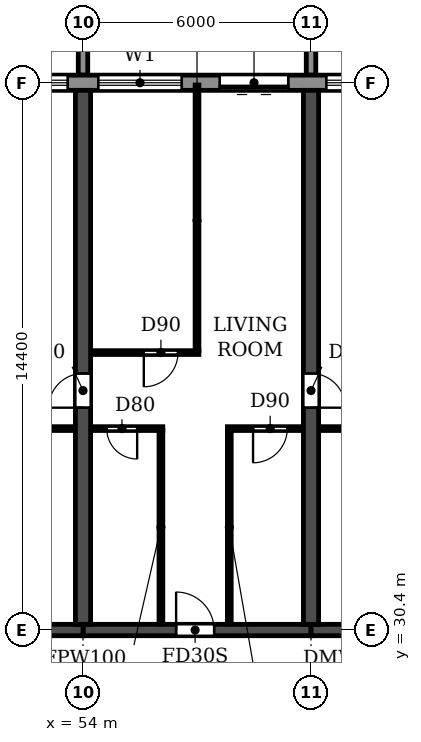
"""IFC4 building model, lengths in metres.
Left out: names, types, materials, properties, quantities, classifications, styles, units other than length and angle.
Written with IfcOpenShell. Run it as: python <this file> out.ifc"""

import sys

from ifc_helpers import new_model, si_unit, direction, frame, frame_2d, origin, place, context, subcontext, project, spatial, polyline, rectangle, outline, extrude, source, transform, mapped, element, fill, save


model = new_model("IFC4")
c1 = context("Model", 3, precision=1e-05, world=origin(), true_north=direction((0.0, 1.0)))
c2 = subcontext(c1, "Body", "Model", "MODEL_VIEW")
j1 = project(units=[si_unit("LENGTHUNIT", "METRE"), si_unit("PLANEANGLEUNIT", "RADIAN")], contexts=[c1])
p1 = place(None, origin())
s1 = spatial("IfcSite", under=j1, at=p1, CompositionType="ELEMENT")
p2 = place(p1, origin())
s2 = spatial("IfcBuilding", under=s1, at=p2, CompositionType="ELEMENT")
p3 = place(p2, frame((0.0, 0.0, 43.2)))
s3 = spatial("IfcBuildingStorey", under=s2, at=p3, CompositionType="ELEMENT", Elevation=43.2)
p4 = place(p3, frame((54.0, 30.55, 0.0), z_axis=(0.0, 0.0, 1.0), x_axis=(0.0, 1.0, 0.0)))
e1 = element("IfcWall", 1, at=p4, inside=s3, PredefinedType="SHEAR", context=c2, shape_type="SweptSolid", body=[
    extrude(rectangle(XDim=14.05, YDim=0.4, at=frame_2d((7.025, 0.0))), origin(), (0.0, 0.0, 1.0), 3.05),
])
p5 = place(p4, frame((5.7, 0.0, 0.0)))
e2 = element("IfcOpeningElement", 2, at=p5, cuts=e1, PredefinedType="OPENING", context=c2, shape_type="SweptSolid", body=[
    extrude(rectangle(XDim=0.9, YDim=2.1, at=frame_2d((0.45, 1.05))), frame((0.0, 0.21, 0.0), z_axis=(0.0, -1.0, 0.0), x_axis=(1.0, 0.0, 0.0)), (0.0, 0.0, 1.0), 0.42),
])
p6 = place(p3, frame((60.0, 30.55, 0.0), z_axis=(0.0, 0.0, 1.0), x_axis=(0.0, 1.0, 0.0)))
e3 = element("IfcWall", 3, at=p6, inside=s3, PredefinedType="SHEAR", context=c2, shape_type="SweptSolid", body=[
    extrude(rectangle(XDim=14.05, YDim=0.4, at=frame_2d((7.025, 0.0))), origin(), (0.0, 0.0, 1.0), 3.05),
])
p7 = place(p6, frame((5.7, 0.0, 0.0)))
e4 = element("IfcOpeningElement", 4, at=p7, cuts=e3, PredefinedType="OPENING", context=c2, shape_type="SweptSolid", body=[
    extrude(rectangle(XDim=0.9, YDim=2.1, at=frame_2d((0.45, 1.05))), frame((0.0, 0.21, 0.0), z_axis=(0.0, -1.0, 0.0), x_axis=(1.0, 0.0, 0.0)), (0.0, 0.0, 1.0), 0.42),
])
p8 = place(p3, frame((48.0, 30.4, 0.0), z_axis=(0.0, 0.0, 1.0), x_axis=(1.0, 0.0, 0.0)))
e5 = element("IfcWall", 5, at=p8, inside=s3, PredefinedType="SHEAR", context=c2, shape_type="SweptSolid", body=[
    extrude(rectangle(XDim=6.0, YDim=0.3, at=frame_2d((3.0, 0.0))), origin(), (0.0, 0.0, 1.0), 2.45),
])
p9 = place(p3, frame((54.0, 30.4, 0.0), z_axis=(0.0, 0.0, 1.0), x_axis=(1.0, 0.0, 0.0)))
e6 = element("IfcWall", 6, at=p9, inside=s3, PredefinedType="SHEAR", context=c2, shape_type="SweptSolid", body=[
    extrude(rectangle(XDim=6.0, YDim=0.3, at=frame_2d((3.0, 0.0))), origin(), (0.0, 0.0, 1.0), 2.45),
])
p10 = place(p9, frame((2.45, 0.0, 0.0)))
e7 = element("IfcOpeningElement", 7, at=p10, cuts=e6, PredefinedType="OPENING", context=c2, shape_type="SweptSolid", body=[
    extrude(rectangle(XDim=1.0, YDim=2.1, at=frame_2d((0.5, 1.05))), frame((0.0, 0.16, 0.0), z_axis=(0.0, -1.0, 0.0), x_axis=(1.0, 0.0, 0.0)), (0.0, 0.0, 1.0), 0.32),
])
p11 = place(p3, frame((60.0, 30.4, 0.0), z_axis=(0.0, 0.0, 1.0), x_axis=(1.0, 0.0, 0.0)))
e8 = element("IfcWall", 8, at=p11, inside=s3, PredefinedType="SHEAR", context=c2, shape_type="SweptSolid", body=[
    extrude(rectangle(XDim=6.0, YDim=0.3, at=frame_2d((3.0, 0.0))), origin(), (0.0, 0.0, 1.0), 2.45),
])
p12 = place(p3, frame((97.317, 44.8, 0.0), z_axis=(0.0, 0.0, 1.0), x_axis=(-1.0, 0.0, 0.0)))
e9 = element("IfcWall", 9, at=p12, inside=s3, PredefinedType="STANDARD", context=c2, shape_type="SweptSolid", body=[
    extrude(rectangle(XDim=92.634, YDim=0.4, at=frame_2d((46.317, 0.0))), origin(), (0.0, 0.0, 1.0), 3.05),
])
p13 = place(p12, frame((88.917, 0.0, 0.0)))
e10 = element("IfcOpeningElement", 10, at=p13, cuts=e9, PredefinedType="OPENING", context=c2, shape_type="SweptSolid", body=[
    extrude(rectangle(XDim=1.8, YDim=2.4, at=frame_2d((0.9, 1.2))), frame((0.0, 0.21, 0.0), z_axis=(0.0, -1.0, 0.0), x_axis=(1.0, 0.0, 0.0)), (0.0, 0.0, 1.0), 0.42),
])
p14 = place(p12, frame((85.717, 0.0, 0.9)))
e11 = element("IfcOpeningElement", 11, at=p14, cuts=e9, PredefinedType="OPENING", context=c2, shape_type="SweptSolid", body=[
    extrude(rectangle(XDim=2.2, YDim=1.5, at=frame_2d((1.1, 0.75))), frame((0.0, 0.21, 0.0), z_axis=(0.0, -1.0, 0.0), x_axis=(1.0, 0.0, 0.0)), (0.0, 0.0, 1.0), 0.42),
])
p15 = place(p12, frame((82.717, 0.0, 0.9)))
e12 = element("IfcOpeningElement", 12, at=p15, cuts=e9, PredefinedType="OPENING", context=c2, shape_type="SweptSolid", body=[
    extrude(rectangle(XDim=2.2, YDim=1.5, at=frame_2d((1.1, 0.75))), frame((0.0, 0.21, 0.0), z_axis=(0.0, -1.0, 0.0), x_axis=(1.0, 0.0, 0.0)), (0.0, 0.0, 1.0), 0.42),
])
p16 = place(p12, frame((79.717, 0.0, 0.9)))
e13 = element("IfcOpeningElement", 13, at=p16, cuts=e9, PredefinedType="OPENING", context=c2, shape_type="SweptSolid", body=[
    extrude(rectangle(XDim=2.2, YDim=1.5, at=frame_2d((1.1, 0.75))), frame((0.0, 0.21, 0.0), z_axis=(0.0, -1.0, 0.0), x_axis=(1.0, 0.0, 0.0)), (0.0, 0.0, 1.0), 0.42),
])
p17 = place(p12, frame((76.717, 0.0, 0.9)))
e14 = element("IfcOpeningElement", 14, at=p17, cuts=e9, PredefinedType="OPENING", context=c2, shape_type="SweptSolid", body=[
    extrude(rectangle(XDim=2.2, YDim=1.5, at=frame_2d((1.1, 0.75))), frame((0.0, 0.21, 0.0), z_axis=(0.0, -1.0, 0.0), x_axis=(1.0, 0.0, 0.0)), (0.0, 0.0, 1.0), 0.42),
])
p18 = place(p12, frame((73.917, 0.0, 0.0)))
e15 = element("IfcOpeningElement", 15, at=p18, cuts=e9, PredefinedType="OPENING", context=c2, shape_type="SweptSolid", body=[
    extrude(rectangle(XDim=1.8, YDim=2.4, at=frame_2d((0.9, 1.2))), frame((0.0, 0.21, 0.0), z_axis=(0.0, -1.0, 0.0), x_axis=(1.0, 0.0, 0.0)), (0.0, 0.0, 1.0), 0.42),
])
p19 = place(p12, frame((70.717, 0.0, 0.9)))
e16 = element("IfcOpeningElement", 16, at=p19, cuts=e9, PredefinedType="OPENING", context=c2, shape_type="SweptSolid", body=[
    extrude(rectangle(XDim=2.2, YDim=1.5, at=frame_2d((1.1, 0.75))), frame((0.0, 0.21, 0.0), z_axis=(0.0, -1.0, 0.0), x_axis=(1.0, 0.0, 0.0)), (0.0, 0.0, 1.0), 0.42),
])
p20 = place(p12, frame((67.717, 0.0, 0.9)))
e17 = element("IfcOpeningElement", 17, at=p20, cuts=e9, PredefinedType="OPENING", context=c2, shape_type="SweptSolid", body=[
    extrude(rectangle(XDim=2.2, YDim=1.5, at=frame_2d((1.1, 0.75))), frame((0.0, 0.21, 0.0), z_axis=(0.0, -1.0, 0.0), x_axis=(1.0, 0.0, 0.0)), (0.0, 0.0, 1.0), 0.42),
])
p21 = place(p12, frame((64.717, 0.0, 0.9)))
e18 = element("IfcOpeningElement", 18, at=p21, cuts=e9, PredefinedType="OPENING", context=c2, shape_type="SweptSolid", body=[
    extrude(rectangle(XDim=2.2, YDim=1.5, at=frame_2d((1.1, 0.75))), frame((0.0, 0.21, 0.0), z_axis=(0.0, -1.0, 0.0), x_axis=(1.0, 0.0, 0.0)), (0.0, 0.0, 1.0), 0.42),
])
p22 = place(p12, frame((61.917, 0.0, 0.0)))
e19 = element("IfcOpeningElement", 19, at=p22, cuts=e9, PredefinedType="OPENING", context=c2, shape_type="SweptSolid", body=[
    extrude(rectangle(XDim=1.8, YDim=2.4, at=frame_2d((0.9, 1.2))), frame((0.0, 0.21, 0.0), z_axis=(0.0, -1.0, 0.0), x_axis=(1.0, 0.0, 0.0)), (0.0, 0.0, 1.0), 0.42),
])
p23 = place(p12, frame((58.717, 0.0, 0.9)))
e20 = element("IfcOpeningElement", 20, at=p23, cuts=e9, PredefinedType="OPENING", context=c2, shape_type="SweptSolid", body=[
    extrude(rectangle(XDim=2.2, YDim=1.5, at=frame_2d((1.1, 0.75))), frame((0.0, 0.21, 0.0), z_axis=(0.0, -1.0, 0.0), x_axis=(1.0, 0.0, 0.0)), (0.0, 0.0, 1.0), 0.42),
])
p24 = place(p12, frame((55.717, 0.0, 0.9)))
e21 = element("IfcOpeningElement", 21, at=p24, cuts=e9, PredefinedType="OPENING", context=c2, shape_type="SweptSolid", body=[
    extrude(rectangle(XDim=2.2, YDim=1.5, at=frame_2d((1.1, 0.75))), frame((0.0, 0.21, 0.0), z_axis=(0.0, -1.0, 0.0), x_axis=(1.0, 0.0, 0.0)), (0.0, 0.0, 1.0), 0.42),
])
p25 = place(p12, frame((52.717, 0.0, 0.9)))
e22 = element("IfcOpeningElement", 22, at=p25, cuts=e9, PredefinedType="OPENING", context=c2, shape_type="SweptSolid", body=[
    extrude(rectangle(XDim=2.2, YDim=1.5, at=frame_2d((1.1, 0.75))), frame((0.0, 0.21, 0.0), z_axis=(0.0, -1.0, 0.0), x_axis=(1.0, 0.0, 0.0)), (0.0, 0.0, 1.0), 0.42),
])
p26 = place(p12, frame((49.917, 0.0, 0.0)))
e23 = element("IfcOpeningElement", 23, at=p26, cuts=e9, PredefinedType="OPENING", context=c2, shape_type="SweptSolid", body=[
    extrude(rectangle(XDim=1.8, YDim=2.4, at=frame_2d((0.9, 1.2))), frame((0.0, 0.21, 0.0), z_axis=(0.0, -1.0, 0.0), x_axis=(1.0, 0.0, 0.0)), (0.0, 0.0, 1.0), 0.42),
])
p27 = place(p12, frame((46.717, 0.0, 0.9)))
e24 = element("IfcOpeningElement", 24, at=p27, cuts=e9, PredefinedType="OPENING", context=c2, shape_type="SweptSolid", body=[
    extrude(rectangle(XDim=2.2, YDim=1.5, at=frame_2d((1.1, 0.75))), frame((0.0, 0.21, 0.0), z_axis=(0.0, -1.0, 0.0), x_axis=(1.0, 0.0, 0.0)), (0.0, 0.0, 1.0), 0.42),
])
p28 = place(p12, frame((43.717, 0.0, 0.9)))
e25 = element("IfcOpeningElement", 25, at=p28, cuts=e9, PredefinedType="OPENING", context=c2, shape_type="SweptSolid", body=[
    extrude(rectangle(XDim=2.2, YDim=1.5, at=frame_2d((1.1, 0.75))), frame((0.0, 0.21, 0.0), z_axis=(0.0, -1.0, 0.0), x_axis=(1.0, 0.0, 0.0)), (0.0, 0.0, 1.0), 0.42),
])
p29 = place(p12, frame((40.717, 0.0, 0.9)))
e26 = element("IfcOpeningElement", 26, at=p29, cuts=e9, PredefinedType="OPENING", context=c2, shape_type="SweptSolid", body=[
    extrude(rectangle(XDim=2.2, YDim=1.5, at=frame_2d((1.1, 0.75))), frame((0.0, 0.21, 0.0), z_axis=(0.0, -1.0, 0.0), x_axis=(1.0, 0.0, 0.0)), (0.0, 0.0, 1.0), 0.42),
])
p30 = place(p12, frame((37.917, 0.0, 0.0)))
e27 = element("IfcOpeningElement", 27, at=p30, cuts=e9, PredefinedType="OPENING", context=c2, shape_type="SweptSolid", body=[
    extrude(rectangle(XDim=1.8, YDim=2.4, at=frame_2d((0.9, 1.2))), frame((0.0, 0.21, 0.0), z_axis=(0.0, -1.0, 0.0), x_axis=(1.0, 0.0, 0.0)), (0.0, 0.0, 1.0), 0.42),
])
p31 = place(p12, frame((34.717, 0.0, 0.9)))
e28 = element("IfcOpeningElement", 28, at=p31, cuts=e9, PredefinedType="OPENING", context=c2, shape_type="SweptSolid", body=[
    extrude(rectangle(XDim=2.2, YDim=1.5, at=frame_2d((1.1, 0.75))), frame((0.0, 0.21, 0.0), z_axis=(0.0, -1.0, 0.0), x_axis=(1.0, 0.0, 0.0)), (0.0, 0.0, 1.0), 0.42),
])
p32 = place(p12, frame((31.717, 0.0, 0.9)))
e29 = element("IfcOpeningElement", 29, at=p32, cuts=e9, PredefinedType="OPENING", context=c2, shape_type="SweptSolid", body=[
    extrude(rectangle(XDim=2.2, YDim=1.5, at=frame_2d((1.1, 0.75))), frame((0.0, 0.21, 0.0), z_axis=(0.0, -1.0, 0.0), x_axis=(1.0, 0.0, 0.0)), (0.0, 0.0, 1.0), 0.42),
])
p33 = place(p12, frame((28.717, 0.0, 0.9)))
e30 = element("IfcOpeningElement", 30, at=p33, cuts=e9, PredefinedType="OPENING", context=c2, shape_type="SweptSolid", body=[
    extrude(rectangle(XDim=2.2, YDim=1.5, at=frame_2d((1.1, 0.75))), frame((0.0, 0.21, 0.0), z_axis=(0.0, -1.0, 0.0), x_axis=(1.0, 0.0, 0.0)), (0.0, 0.0, 1.0), 0.42),
])
p34 = place(p12, frame((25.917, 0.0, 0.0)))
e31 = element("IfcOpeningElement", 31, at=p34, cuts=e9, PredefinedType="OPENING", context=c2, shape_type="SweptSolid", body=[
    extrude(rectangle(XDim=1.8, YDim=2.4, at=frame_2d((0.9, 1.2))), frame((0.0, 0.21, 0.0), z_axis=(0.0, -1.0, 0.0), x_axis=(1.0, 0.0, 0.0)), (0.0, 0.0, 1.0), 0.42),
])
p35 = place(p12, frame((22.917, 0.0, 0.0)))
e32 = element("IfcOpeningElement", 32, at=p35, cuts=e9, PredefinedType="OPENING", context=c2, shape_type="SweptSolid", body=[
    extrude(rectangle(XDim=1.8, YDim=2.4, at=frame_2d((0.9, 1.2))), frame((0.0, 0.21, 0.0), z_axis=(0.0, -1.0, 0.0), x_axis=(1.0, 0.0, 0.0)), (0.0, 0.0, 1.0), 0.42),
])
p36 = place(p12, frame((19.717, 0.0, 0.9)))
e33 = element("IfcOpeningElement", 33, at=p36, cuts=e9, PredefinedType="OPENING", context=c2, shape_type="SweptSolid", body=[
    extrude(rectangle(XDim=2.2, YDim=1.5, at=frame_2d((1.1, 0.75))), frame((0.0, 0.21, 0.0), z_axis=(0.0, -1.0, 0.0), x_axis=(1.0, 0.0, 0.0)), (0.0, 0.0, 1.0), 0.42),
])
p37 = place(p12, frame((16.717, 0.0, 0.9)))
e34 = element("IfcOpeningElement", 34, at=p37, cuts=e9, PredefinedType="OPENING", context=c2, shape_type="SweptSolid", body=[
    extrude(rectangle(XDim=2.2, YDim=1.5, at=frame_2d((1.1, 0.75))), frame((0.0, 0.21, 0.0), z_axis=(0.0, -1.0, 0.0), x_axis=(1.0, 0.0, 0.0)), (0.0, 0.0, 1.0), 0.42),
])
p38 = place(p12, frame((13.717, 0.0, 0.9)))
e35 = element("IfcOpeningElement", 35, at=p38, cuts=e9, PredefinedType="OPENING", context=c2, shape_type="SweptSolid", body=[
    extrude(rectangle(XDim=2.2, YDim=1.5, at=frame_2d((1.1, 0.75))), frame((0.0, 0.21, 0.0), z_axis=(0.0, -1.0, 0.0), x_axis=(1.0, 0.0, 0.0)), (0.0, 0.0, 1.0), 0.42),
])
p39 = place(p12, frame((10.717, 0.0, 0.9)))
e36 = element("IfcOpeningElement", 36, at=p39, cuts=e9, PredefinedType="OPENING", context=c2, shape_type="SweptSolid", body=[
    extrude(rectangle(XDim=2.2, YDim=1.5, at=frame_2d((1.1, 0.75))), frame((0.0, 0.21, 0.0), z_axis=(0.0, -1.0, 0.0), x_axis=(1.0, 0.0, 0.0)), (0.0, 0.0, 1.0), 0.42),
])
p40 = place(p12, frame((7.917, 0.0, 0.0)))
e37 = element("IfcOpeningElement", 37, at=p40, cuts=e9, PredefinedType="OPENING", context=c2, shape_type="SweptSolid", body=[
    extrude(rectangle(XDim=1.8, YDim=2.4, at=frame_2d((0.9, 1.2))), frame((0.0, 0.21, 0.0), z_axis=(0.0, -1.0, 0.0), x_axis=(1.0, 0.0, 0.0)), (0.0, 0.0, 1.0), 0.42),
])
p41 = place(p12, frame((4.717, 0.0, 0.9)))
e38 = element("IfcOpeningElement", 38, at=p41, cuts=e9, PredefinedType="OPENING", context=c2, shape_type="SweptSolid", body=[
    extrude(rectangle(XDim=2.2, YDim=1.5, at=frame_2d((1.1, 0.75))), frame((0.0, 0.21, 0.0), z_axis=(0.0, -1.0, 0.0), x_axis=(1.0, 0.0, 0.0)), (0.0, 0.0, 1.0), 0.42),
])
p42 = place(p12, frame((1.917, 0.0, 0.0)))
e39 = element("IfcOpeningElement", 39, at=p42, cuts=e9, PredefinedType="OPENING", context=c2, shape_type="SweptSolid", body=[
    extrude(rectangle(XDim=1.8, YDim=2.4, at=frame_2d((0.9, 1.2))), frame((0.0, 0.21, 0.0), z_axis=(0.0, -1.0, 0.0), x_axis=(1.0, 0.0, 0.0)), (0.0, 0.0, 1.0), 0.42),
])
m1 = source(origin(), c2, "Body", "SweptSolid", [
    extrude(outline(polyline([(0.0, 0.0), (0.25, 0.0), (0.25, 3.1), (0.0, 3.1), (0.0, 0.0)])), origin(), (0.0, 0.0, 1.0), 3.1),
])
for number, where in (
    (40, (53.875, 45.0, 0.0)),
    (41, (59.875, 45.0, 0.0)),
):
    element("IfcWall", number, at=place(p3, frame(where)), inside=s3, PredefinedType="STANDARD", context=c2, shape_type="MappedRepresentation", body=[
        mapped(m1, transform((0.0, 0.0, 0.0))),
    ])
p43 = place(p3, frame((51.1, 35.7, 0.0), z_axis=(0.0, 0.0, 1.0), x_axis=(1.0, 0.0, 0.0)))
e42 = element("IfcWall", 42, at=p43, inside=s3, PredefinedType="PARTITIONING", context=c2, shape_type="SweptSolid", body=[
    extrude(rectangle(XDim=2.69, YDim=0.1, at=frame_2d((1.345, 0.0))), origin(), (0.0, 0.0, 1.0), 3.05),
])
p44 = place(p43, frame((1.0, 0.0, 0.0)))
e43 = element("IfcOpeningElement", 43, at=p44, cuts=e42, PredefinedType="OPENING", context=c2, shape_type="SweptSolid", body=[
    extrude(rectangle(XDim=0.8, YDim=2.1, at=frame_2d((0.4, 1.05))), frame((0.0, 0.06, 0.0), z_axis=(0.0, -1.0, 0.0), x_axis=(1.0, 0.0, 0.0)), (0.0, 0.0, 1.0), 0.12),
])
p45 = place(p3, frame((54.21, 35.7, 0.0), z_axis=(0.0, 0.0, 1.0), x_axis=(1.0, 0.0, 0.0)))
e44 = element("IfcWall", 44, at=p45, inside=s3, PredefinedType="PARTITIONING", context=c2, shape_type="SweptSolid", body=[
    extrude(rectangle(XDim=1.89, YDim=0.1, at=frame_2d((0.945, 0.0))), origin(), (0.0, 0.0, 1.0), 3.05),
])
p46 = place(p45, frame((0.415, 0.0, 0.0)))
e45 = element("IfcOpeningElement", 45, at=p46, cuts=e44, PredefinedType="OPENING", context=c2, shape_type="SweptSolid", body=[
    extrude(rectangle(XDim=0.8, YDim=2.1, at=frame_2d((0.4, 1.05))), frame((0.0, 0.06, 0.0), z_axis=(0.0, -1.0, 0.0), x_axis=(1.0, 0.0, 0.0)), (0.0, 0.0, 1.0), 0.12),
])
p47 = place(p3, frame((57.8, 35.7, 0.0), z_axis=(0.0, 0.0, 1.0), x_axis=(1.0, 0.0, 0.0)))
e46 = element("IfcWall", 46, at=p47, inside=s3, PredefinedType="PARTITIONING", context=c2, shape_type="SweptSolid", body=[
    extrude(rectangle(XDim=1.99, YDim=0.1, at=frame_2d((0.995, 0.0))), origin(), (0.0, 0.0, 1.0), 3.05),
])
p48 = place(p47, frame((0.675, 0.0, 0.0)))
e47 = element("IfcOpeningElement", 47, at=p48, cuts=e46, PredefinedType="OPENING", context=c2, shape_type="SweptSolid", body=[
    extrude(rectangle(XDim=0.9, YDim=2.1, at=frame_2d((0.45, 1.05))), frame((0.0, 0.06, 0.0), z_axis=(0.0, -1.0, 0.0), x_axis=(1.0, 0.0, 0.0)), (0.0, 0.0, 1.0), 0.12),
])
p49 = place(p3, frame((60.21, 35.7, 0.0), z_axis=(0.0, 0.0, 1.0), x_axis=(1.0, 0.0, 0.0)))
e48 = element("IfcWall", 48, at=p49, inside=s3, PredefinedType="PARTITIONING", context=c2, shape_type="SweptSolid", body=[
    extrude(rectangle(XDim=2.89, YDim=0.1, at=frame_2d((1.445, 0.0))), origin(), (0.0, 0.0, 1.0), 3.05),
])
p50 = place(p49, frame((0.89, 0.0, 0.0)))
e49 = element("IfcOpeningElement", 49, at=p50, cuts=e48, PredefinedType="OPENING", context=c2, shape_type="SweptSolid", body=[
    extrude(rectangle(XDim=0.8, YDim=2.1, at=frame_2d((0.4, 1.05))), frame((0.0, 0.06, 0.0), z_axis=(0.0, -1.0, 0.0), x_axis=(1.0, 0.0, 0.0)), (0.0, 0.0, 1.0), 0.12),
])
p51 = place(p3, frame((54.21, 37.7, 0.0), z_axis=(0.0, 0.0, 1.0), x_axis=(1.0, 0.0, 0.0)))
e50 = element("IfcWall", 50, at=p51, inside=s3, PredefinedType="PARTITIONING", context=c2, shape_type="SweptSolid", body=[
    extrude(rectangle(XDim=2.84, YDim=0.1, at=frame_2d((1.42, 0.0))), origin(), (0.0, 0.0, 1.0), 3.05),
])
p52 = place(p51, frame((1.39, 0.0, 0.0)))
e51 = element("IfcOpeningElement", 51, at=p52, cuts=e50, PredefinedType="OPENING", context=c2, shape_type="SweptSolid", body=[
    extrude(rectangle(XDim=0.9, YDim=2.1, at=frame_2d((0.45, 1.05))), frame((0.0, 0.06, 0.0), z_axis=(0.0, -1.0, 0.0), x_axis=(1.0, 0.0, 0.0)), (0.0, 0.0, 1.0), 0.12),
])
p53 = place(p3, frame((56.05, 30.56, 0.0), z_axis=(0.0, 0.0, 1.0), x_axis=(0.0, 1.0, 0.0)))
e52 = element("IfcWall", 52, at=p53, inside=s3, PredefinedType="PARTITIONING", context=c2, shape_type="SweptSolid", body=[
    extrude(rectangle(XDim=5.09, YDim=0.1, at=frame_2d((2.545, 0.0))), origin(), (0.0, 0.0, 1.0), 3.05),
])
p54 = place(p3, frame((57.0, 37.75, 0.0), z_axis=(0.0, 0.0, 1.0), x_axis=(0.0, 1.0, 0.0)))
e53 = element("IfcWall", 53, at=p54, inside=s3, PredefinedType="PARTITIONING", context=c2, shape_type="SweptSolid", body=[
    extrude(rectangle(XDim=6.99, YDim=0.1, at=frame_2d((3.495, 0.0))), origin(), (0.0, 0.0, 1.0), 3.05),
])
p55 = place(p3, frame((57.85, 30.56, 0.0), z_axis=(0.0, 0.0, 1.0), x_axis=(0.0, 1.0, 0.0)))
e54 = element("IfcWall", 54, at=p55, inside=s3, PredefinedType="PARTITIONING", context=c2, shape_type="SweptSolid", body=[
    extrude(rectangle(XDim=5.09, YDim=0.1, at=frame_2d((2.545, 0.0))), origin(), (0.0, 0.0, 1.0), 3.05),
])
p56 = place(p28, origin())
e55 = element("IfcWindow", 55, at=p56, inside=s3, PartitioningType="DOUBLE_PANEL_HORIZONTAL", PredefinedType="WINDOW", context=c2, shape_type="SweptSolid", body=[
    extrude(rectangle(XDim=2.2, YDim=1.5, at=frame_2d((1.1, 0.75))), frame((0.0, 0.03, 0.0), z_axis=(0.0, -1.0, 0.0), x_axis=(1.0, 0.0, 0.0)), (0.0, 0.0, 1.0), 0.06),
])
fill(e25, e55)
p57 = place(p29, origin())
e56 = element("IfcWindow", 56, at=p57, inside=s3, PartitioningType="DOUBLE_PANEL_HORIZONTAL", PredefinedType="WINDOW", context=c2, shape_type="SweptSolid", body=[
    extrude(rectangle(XDim=2.2, YDim=1.5, at=frame_2d((1.1, 0.75))), frame((0.0, 0.03, 0.0), z_axis=(0.0, -1.0, 0.0), x_axis=(1.0, 0.0, 0.0)), (0.0, 0.0, 1.0), 0.06),
])
fill(e26, e56)
p58 = place(p30, origin())
e57 = element("IfcDoor", 57, at=p58, inside=s3, OperationType="DOUBLE_DOOR_SLIDING", PredefinedType="DOOR", context=c2, shape_type="SweptSolid", body=[
    extrude(rectangle(XDim=1.8, YDim=2.4, at=frame_2d((0.9, 1.2))), frame((0.0, 0.025, 0.0), z_axis=(0.0, -1.0, 0.0), x_axis=(1.0, 0.0, 0.0)), (0.0, 0.0, 1.0), 0.05),
])
fill(e27, e57)
p59 = place(p31, origin())
e58 = element("IfcWindow", 58, at=p59, inside=s3, PartitioningType="DOUBLE_PANEL_HORIZONTAL", PredefinedType="WINDOW", context=c2, shape_type="SweptSolid", body=[
    extrude(rectangle(XDim=2.2, YDim=1.5, at=frame_2d((1.1, 0.75))), frame((0.0, 0.03, 0.0), z_axis=(0.0, -1.0, 0.0), x_axis=(1.0, 0.0, 0.0)), (0.0, 0.0, 1.0), 0.06),
])
fill(e28, e58)
p60 = place(p5, origin())
e59 = element("IfcDoor", 59, at=p60, inside=s3, OperationType="SINGLE_SWING_LEFT", PredefinedType="DOOR", context=c2, shape_type="SweptSolid", body=[
    extrude(rectangle(XDim=0.9, YDim=2.1, at=frame_2d((0.45, 1.05))), frame((0.0, 0.025, 0.0), z_axis=(0.0, -1.0, 0.0), x_axis=(1.0, 0.0, 0.0)), (0.0, 0.0, 1.0), 0.05),
])
fill(e2, e59)
p61 = place(p46, frame((0.8, 0.0, 0.0), z_axis=(0.0, 0.0, 1.0), x_axis=(-1.0, 0.0, 0.0)))
e60 = element("IfcDoor", 60, at=p61, inside=s3, OperationType="SINGLE_SWING_LEFT", PredefinedType="DOOR", context=c2, shape_type="SweptSolid", body=[
    extrude(rectangle(XDim=0.8, YDim=2.1, at=frame_2d((0.4, 1.05))), frame((0.0, 0.025, 0.0), z_axis=(0.0, -1.0, 0.0), x_axis=(1.0, 0.0, 0.0)), (0.0, 0.0, 1.0), 0.05),
])
fill(e45, e60)
p62 = place(p52, frame((0.9, 0.0, 0.0), z_axis=(0.0, 0.0, 1.0), x_axis=(-1.0, 0.0, 0.0)))
e61 = element("IfcDoor", 61, at=p62, inside=s3, OperationType="SINGLE_SWING_RIGHT", PredefinedType="DOOR", context=c2, shape_type="SweptSolid", body=[
    extrude(rectangle(XDim=0.9, YDim=2.1, at=frame_2d((0.45, 1.05))), frame((0.0, 0.025, 0.0), z_axis=(0.0, -1.0, 0.0), x_axis=(1.0, 0.0, 0.0)), (0.0, 0.0, 1.0), 0.05),
])
fill(e51, e61)
p63 = place(p10, origin())
e62 = element("IfcDoor", 62, at=p63, inside=s3, OperationType="SINGLE_SWING_LEFT", PredefinedType="DOOR", context=c2, shape_type="SweptSolid", body=[
    extrude(rectangle(XDim=1.0, YDim=2.1, at=frame_2d((0.5, 1.05))), frame((0.0, 0.025, 0.0), z_axis=(0.0, -1.0, 0.0), x_axis=(1.0, 0.0, 0.0)), (0.0, 0.0, 1.0), 0.05),
])
fill(e7, e62)
p64 = place(p48, frame((0.9, 0.0, 0.0), z_axis=(0.0, 0.0, 1.0), x_axis=(-1.0, 0.0, 0.0)))
e63 = element("IfcDoor", 63, at=p64, inside=s3, OperationType="SINGLE_SWING_RIGHT", PredefinedType="DOOR", context=c2, shape_type="SweptSolid", body=[
    extrude(rectangle(XDim=0.9, YDim=2.1, at=frame_2d((0.45, 1.05))), frame((0.0, 0.025, 0.0), z_axis=(0.0, -1.0, 0.0), x_axis=(1.0, 0.0, 0.0)), (0.0, 0.0, 1.0), 0.05),
])
fill(e47, e63)
p65 = place(p7, frame((0.9, 0.0, 0.0), z_axis=(0.0, 0.0, 1.0), x_axis=(-1.0, 0.0, 0.0)))
e64 = element("IfcDoor", 64, at=p65, inside=s3, OperationType="SINGLE_SWING_RIGHT", PredefinedType="DOOR", context=c2, shape_type="SweptSolid", body=[
    extrude(rectangle(XDim=0.9, YDim=2.1, at=frame_2d((0.45, 1.05))), frame((0.0, 0.025, 0.0), z_axis=(0.0, -1.0, 0.0), x_axis=(1.0, 0.0, 0.0)), (0.0, 0.0, 1.0), 0.05),
])
fill(e4, e64)
save(model, sys.argv[1])
